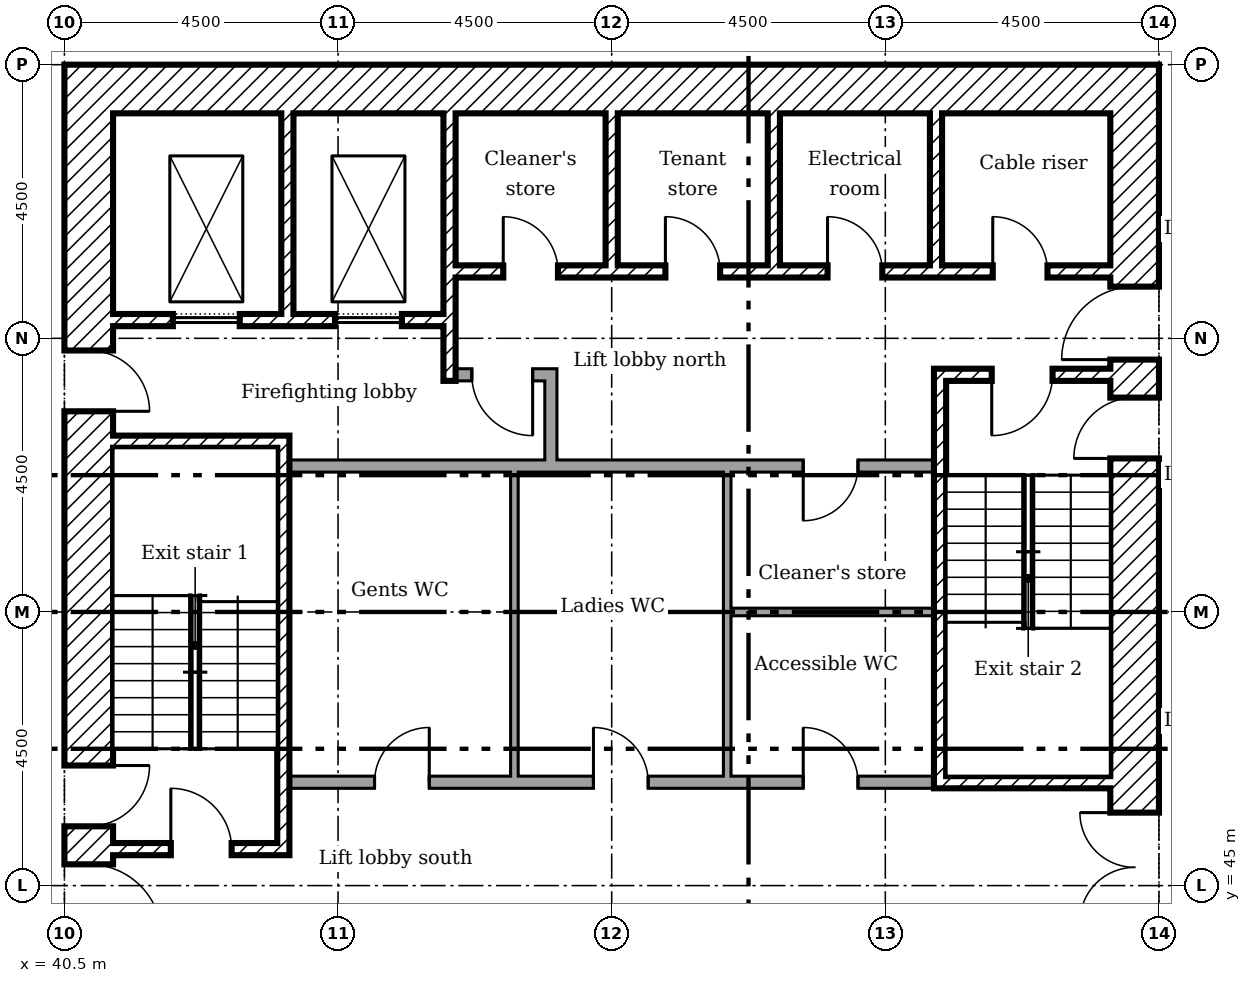
"""IFC4 building model, lengths in metres.
Left out: names, types, materials, properties, quantities, classifications, styles, units other than length and angle.
Written with IfcOpenShell. Run it as: python <this file> out.ifc"""

import sys

from ifc_helpers import new_model, si_unit, direction, frame, frame_2d, origin, place, context, subcontext, project, spatial, rectangle, extrude, element, fill, save


model = new_model("IFC4")
c1 = context("Model", 3, precision=1e-05, world=origin(), true_north=direction((0.0, 1.0)))
c2 = subcontext(c1, "Body", "Model", "MODEL_VIEW")
j1 = project(units=[si_unit("LENGTHUNIT", "METRE"), si_unit("PLANEANGLEUNIT", "RADIAN")], contexts=[c1])
p1 = place(None, origin())
s1 = spatial("IfcSite", under=j1, at=p1, CompositionType="ELEMENT")
p2 = place(p1, origin())
s2 = spatial("IfcBuilding", under=s1, at=p2, CompositionType="ELEMENT")
p3 = place(p2, frame((0.0, 0.0, 76.2)))
s3 = spatial("IfcBuildingStorey", under=s2, at=p3, CompositionType="ELEMENT", Elevation=76.2)
p4 = place(p3, frame((58.1, 40.5, 0.0), z_axis=(0.0, 0.0, 1.0), x_axis=(0.0, 1.0, 0.0)))
e1 = element("IfcWall", 1, at=p4, inside=s3, PredefinedType="SHEAR", context=c2, shape_type="SweptSolid", body=[
    extrude(rectangle(XDim=18.0, YDim=0.8, at=frame_2d((9.0, 0.0))), origin(), (0.0, 0.0, 1.0), 3.35),
])
p5 = place(p4, frame((13.15, 0.0, 0.0)))
e2 = element("IfcOpeningElement", 2, at=p5, cuts=e1, PredefinedType="OPENING", context=c2, shape_type="SweptSolid", body=[
    extrude(rectangle(XDim=1.2, YDim=2.1, at=frame_2d((0.6, 1.05))), frame((0.0, 0.41, 0.0), z_axis=(0.0, -1.0, 0.0), x_axis=(1.0, 0.0, 0.0)), (0.0, 0.0, 1.0), 0.82),
])
p6 = place(p4, frame((3.9, 0.0, 0.0)))
e3 = element("IfcOpeningElement", 3, at=p6, cuts=e1, PredefinedType="OPENING", context=c2, shape_type="SweptSolid", body=[
    extrude(rectangle(XDim=1.8, YDim=2.1, at=frame_2d((0.9, 1.05))), frame((0.0, 0.41, 0.0), z_axis=(0.0, -1.0, 0.0), x_axis=(1.0, 0.0, 0.0)), (0.0, 0.0, 1.0), 0.82),
])
p7 = place(p4, frame((11.525, 0.0, 0.0)))
e4 = element("IfcOpeningElement", 4, at=p7, cuts=e1, PredefinedType="OPENING", context=c2, shape_type="SweptSolid", body=[
    extrude(rectangle(XDim=1.0, YDim=2.1, at=frame_2d((0.5, 1.05))), frame((0.0, 0.41, 0.0), z_axis=(0.0, -1.0, 0.0), x_axis=(1.0, 0.0, 0.0)), (0.0, 0.0, 1.0), 0.82),
])
p8 = place(p3, frame((41.3, 58.1, 0.0)))
e5 = element("IfcWall", 5, at=p8, inside=s3, PredefinedType="SHEAR", context=c2, shape_type="SweptSolid", body=[
    extrude(rectangle(XDim=16.4, YDim=0.8, at=frame_2d((8.2, 0.0))), origin(), (0.0, 0.0, 1.0), 3.35),
])
p9 = place(p3, frame((40.9, 40.5, 0.0), z_axis=(0.0, 0.0, 1.0), x_axis=(0.0, 1.0, 0.0)))
e6 = element("IfcWall", 6, at=p9, inside=s3, PredefinedType="SHEAR", context=c2, shape_type="SweptSolid", body=[
    extrude(rectangle(XDim=18.0, YDim=0.8, at=frame_2d((9.0, 0.0))), origin(), (0.0, 0.0, 1.0), 3.35),
])
p10 = place(p9, frame((3.65, 0.0, 0.0)))
e7 = element("IfcOpeningElement", 7, at=p10, cuts=e6, PredefinedType="OPENING", context=c2, shape_type="SweptSolid", body=[
    extrude(rectangle(XDim=1.2, YDim=2.1, at=frame_2d((0.6, 1.05))), frame((0.0, 0.41, 0.0), z_axis=(0.0, -1.0, 0.0), x_axis=(1.0, 0.0, 0.0)), (0.0, 0.0, 1.0), 0.82),
])
p11 = place(p9, frame((5.475, 0.0, 0.0)))
e8 = element("IfcOpeningElement", 8, at=p11, cuts=e6, PredefinedType="OPENING", context=c2, shape_type="SweptSolid", body=[
    extrude(rectangle(XDim=1.0, YDim=2.1, at=frame_2d((0.5, 1.05))), frame((0.0, 0.41, 0.0), z_axis=(0.0, -1.0, 0.0), x_axis=(1.0, 0.0, 0.0)), (0.0, 0.0, 1.0), 0.82),
])
p12 = place(p9, frame((12.3, 0.0, 0.0)))
e9 = element("IfcOpeningElement", 9, at=p12, cuts=e6, PredefinedType="OPENING", context=c2, shape_type="SweptSolid", body=[
    extrude(rectangle(XDim=1.0, YDim=2.1, at=frame_2d((0.5, 1.05))), frame((0.0, 0.41, 0.0), z_axis=(0.0, -1.0, 0.0), x_axis=(1.0, 0.0, 0.0)), (0.0, 0.0, 1.0), 0.82),
])
p13 = place(p3, frame((44.167, 57.7, 0.0), z_axis=(0.0, 0.0, 1.0), x_axis=(0.0, -1.0, 0.0)))
e10 = element("IfcWall", 10, at=p13, inside=s3, PredefinedType="SHEAR", context=c2, shape_type="SweptSolid", body=[
    extrude(rectangle(XDim=3.3, YDim=0.2, at=frame_2d((1.65, 0.0))), origin(), (0.0, 0.0, 1.0), 3.35),
])
p14 = place(p3, frame((46.833, 57.7, 0.0), z_axis=(0.0, 0.0, 1.0), x_axis=(0.0, -1.0, 0.0)))
e11 = element("IfcWall", 11, at=p14, inside=s3, PredefinedType="SHEAR", context=c2, shape_type="SweptSolid", body=[
    extrude(rectangle(XDim=4.4, YDim=0.2, at=frame_2d((2.2, 0.0))), origin(), (0.0, 0.0, 1.0), 3.35),
])
for number, where, z_axis, x_axis in (
    (12, (49.5, 57.7, 0.0), (0.0, 0.0, 1.0), (0.0, -1.0, 0.0)),
    (13, (52.167, 57.7, 0.0), (0.0, 0.0, 1.0), (0.0, -1.0, 0.0)),
    (14, (54.833, 57.7, 0.0), (0.0, 0.0, 1.0), (0.0, -1.0, 0.0)),
):
    element("IfcWall", number, at=place(p3, frame(where, z_axis=z_axis, x_axis=x_axis)), inside=s3, PredefinedType="SHEAR", context=c2, shape_type="SweptSolid", body=[
        extrude(rectangle(XDim=2.5, YDim=0.2, at=frame_2d((1.25, 0.0))), origin(), (0.0, 0.0, 1.0), 3.35),
    ])
p15 = place(p3, frame((48.5, 51.9, 0.0), z_axis=(0.0, 0.0, 1.0), x_axis=(0.0, 1.0, 0.0)))
e15 = element("IfcWall", 15, at=p15, inside=s3, PredefinedType="PARTITIONING", context=c2, shape_type="SweptSolid", body=[
    extrude(rectangle(XDim=1.6, YDim=0.2, at=frame_2d((0.8, 0.0))), origin(), (0.0, 0.0, 1.0), 3.35),
])
p16 = place(p3, frame((46.933, 53.4, 0.0)))
e16 = element("IfcWall", 16, at=p16, inside=s3, PredefinedType="PARTITIONING", context=c2, shape_type="SweptSolid", body=[
    extrude(rectangle(XDim=1.467, YDim=0.2, at=frame_2d((0.733, 0.0))), origin(), (0.0, 0.0, 1.0), 3.35),
])
p17 = place(p16, frame((0.267, 0.0, 0.0)))
e17 = element("IfcOpeningElement", 17, at=p17, cuts=e16, PredefinedType="OPENING", context=c2, shape_type="SweptSolid", body=[
    extrude(rectangle(XDim=1.0, YDim=2.1, at=frame_2d((0.5, 1.05))), frame((0.0, 0.11, 0.0), z_axis=(0.0, -1.0, 0.0), x_axis=(1.0, 0.0, 0.0)), (0.0, 0.0, 1.0), 0.22),
])
p18 = place(p3, frame((46.933, 55.1, 0.0)))
e18 = element("IfcWall", 18, at=p18, inside=s3, PredefinedType="SHEAR", context=c2, shape_type="SweptSolid", body=[
    extrude(rectangle(XDim=10.767, YDim=0.2, at=frame_2d((5.383, 0.0))), origin(), (0.0, 0.0, 1.0), 3.35),
])
p19 = place(p18, frame((8.833, 0.0, 0.0)))
e19 = element("IfcOpeningElement", 19, at=p19, cuts=e18, PredefinedType="OPENING", context=c2, shape_type="SweptSolid", body=[
    extrude(rectangle(XDim=0.9, YDim=2.1, at=frame_2d((0.45, 1.05))), frame((0.0, 0.11, 0.0), z_axis=(0.0, -1.0, 0.0), x_axis=(1.0, 0.0, 0.0)), (0.0, 0.0, 1.0), 0.22),
])
p20 = place(p18, frame((0.783, 0.0, 0.0)))
e20 = element("IfcOpeningElement", 20, at=p20, cuts=e18, PredefinedType="OPENING", context=c2, shape_type="SweptSolid", body=[
    extrude(rectangle(XDim=0.9, YDim=2.1, at=frame_2d((0.45, 1.05))), frame((0.0, 0.11, 0.0), z_axis=(0.0, -1.0, 0.0), x_axis=(1.0, 0.0, 0.0)), (0.0, 0.0, 1.0), 0.22),
])
p21 = place(p18, frame((3.45, 0.0, 0.0)))
e21 = element("IfcOpeningElement", 21, at=p21, cuts=e18, PredefinedType="OPENING", context=c2, shape_type="SweptSolid", body=[
    extrude(rectangle(XDim=0.9, YDim=2.1, at=frame_2d((0.45, 1.05))), frame((0.0, 0.11, 0.0), z_axis=(0.0, -1.0, 0.0), x_axis=(1.0, 0.0, 0.0)), (0.0, 0.0, 1.0), 0.22),
])
p22 = place(p18, frame((6.117, 0.0, 0.0)))
e22 = element("IfcOpeningElement", 22, at=p22, cuts=e18, PredefinedType="OPENING", context=c2, shape_type="SweptSolid", body=[
    extrude(rectangle(XDim=0.9, YDim=2.1, at=frame_2d((0.45, 1.05))), frame((0.0, 0.11, 0.0), z_axis=(0.0, -1.0, 0.0), x_axis=(1.0, 0.0, 0.0)), (0.0, 0.0, 1.0), 0.22),
])
p23 = place(p3, frame((41.3, 54.3, 0.0)))
e23 = element("IfcWall", 23, at=p23, inside=s3, PredefinedType="SHEAR", context=c2, shape_type="SweptSolid", body=[
    extrude(rectangle(XDim=5.433, YDim=0.2, at=frame_2d((2.717, 0.0))), origin(), (0.0, 0.0, 1.0), 3.35),
])
p24 = place(p23, frame((0.983, 0.0, 0.0)))
e24 = element("IfcOpeningElement", 24, at=p24, cuts=e23, PredefinedType="OPENING", context=c2, shape_type="SweptSolid", body=[
    extrude(rectangle(XDim=1.1, YDim=2.1, at=frame_2d((0.55, 1.05))), frame((0.0, 0.11, 0.0), z_axis=(0.0, -1.0, 0.0), x_axis=(1.0, 0.0, 0.0)), (0.0, 0.0, 1.0), 0.22),
])
p25 = place(p23, frame((3.65, 0.0, 0.0)))
e25 = element("IfcOpeningElement", 25, at=p25, cuts=e23, PredefinedType="OPENING", context=c2, shape_type="SweptSolid", body=[
    extrude(rectangle(XDim=1.1, YDim=2.1, at=frame_2d((0.55, 1.05))), frame((0.0, 0.11, 0.0), z_axis=(0.0, -1.0, 0.0), x_axis=(1.0, 0.0, 0.0)), (0.0, 0.0, 1.0), 0.22),
])
p26 = place(p3, frame((44.1, 45.5, 0.0), z_axis=(0.0, 0.0, 1.0), x_axis=(0.0, 1.0, 0.0)))
e26 = element("IfcWall", 26, at=p26, inside=s3, PredefinedType="SHEAR", context=c2, shape_type="SweptSolid", body=[
    extrude(rectangle(XDim=6.9, YDim=0.2, at=frame_2d((3.45, 0.0))), origin(), (0.0, 0.0, 1.0), 3.35),
])
p27 = place(p3, frame((41.3, 52.3, 0.0)))
e27 = element("IfcWall", 27, at=p27, inside=s3, PredefinedType="SHEAR", context=c2, shape_type="SweptSolid", body=[
    extrude(rectangle(XDim=2.7, YDim=0.2, at=frame_2d((1.35, 0.0))), origin(), (0.0, 0.0, 1.0), 3.35),
])
p28 = place(p3, frame((41.3, 45.6, 0.0)))
e28 = element("IfcWall", 28, at=p28, inside=s3, PredefinedType="SHEAR", context=c2, shape_type="SweptSolid", body=[
    extrude(rectangle(XDim=2.7, YDim=0.2, at=frame_2d((1.35, 0.0))), origin(), (0.0, 0.0, 1.0), 3.35),
])
p29 = place(p28, frame((0.95, 0.0, 0.0)))
e29 = element("IfcOpeningElement", 29, at=p29, cuts=e28, PredefinedType="OPENING", context=c2, shape_type="SweptSolid", body=[
    extrude(rectangle(XDim=1.0, YDim=2.1, at=frame_2d((0.5, 1.05))), frame((0.0, 0.11, 0.0), z_axis=(0.0, -1.0, 0.0), x_axis=(1.0, 0.0, 0.0)), (0.0, 0.0, 1.0), 0.22),
])
p30 = place(p3, frame((54.8, 53.4, 0.0)))
e30 = element("IfcWall", 30, at=p30, inside=s3, PredefinedType="SHEAR", context=c2, shape_type="SweptSolid", body=[
    extrude(rectangle(XDim=2.9, YDim=0.2, at=frame_2d((1.45, 0.0))), origin(), (0.0, 0.0, 1.0), 3.35),
])
p31 = place(p30, frame((0.95, 0.0, 0.0)))
e31 = element("IfcOpeningElement", 31, at=p31, cuts=e30, PredefinedType="OPENING", context=c2, shape_type="SweptSolid", body=[
    extrude(rectangle(XDim=1.0, YDim=2.1, at=frame_2d((0.5, 1.05))), frame((0.0, 0.11, 0.0), z_axis=(0.0, -1.0, 0.0), x_axis=(1.0, 0.0, 0.0)), (0.0, 0.0, 1.0), 0.22),
])
p32 = place(p3, frame((54.8, 46.7, 0.0)))
e32 = element("IfcWall", 32, at=p32, inside=s3, PredefinedType="SHEAR", context=c2, shape_type="SweptSolid", body=[
    extrude(rectangle(XDim=2.9, YDim=0.2, at=frame_2d((1.45, 0.0))), origin(), (0.0, 0.0, 1.0), 3.35),
])
p33 = place(p3, frame((54.9, 46.8, 0.0), z_axis=(0.0, 0.0, 1.0), x_axis=(0.0, 1.0, 0.0)))
e33 = element("IfcWall", 33, at=p33, inside=s3, PredefinedType="SHEAR", context=c2, shape_type="SweptSolid", body=[
    extrude(rectangle(XDim=6.5, YDim=0.2, at=frame_2d((3.25, 0.0))), origin(), (0.0, 0.0, 1.0), 3.35),
])
p34 = place(p3, frame((44.2, 51.9, 0.0)))
e34 = element("IfcWall", 34, at=p34, inside=s3, PredefinedType="PARTITIONING", context=c2, shape_type="SweptSolid", body=[
    extrude(rectangle(XDim=10.6, YDim=0.2, at=frame_2d((5.3, 0.0))), origin(), (0.0, 0.0, 1.0), 3.35),
])
p35 = place(p34, frame((8.45, 0.0, 0.0)))
e35 = element("IfcOpeningElement", 35, at=p35, cuts=e34, PredefinedType="OPENING", context=c2, shape_type="SweptSolid", body=[
    extrude(rectangle(XDim=0.9, YDim=2.1, at=frame_2d((0.45, 1.05))), frame((0.0, 0.11, 0.0), z_axis=(0.0, -1.0, 0.0), x_axis=(1.0, 0.0, 0.0)), (0.0, 0.0, 1.0), 0.22),
])
p36 = place(p3, frame((44.2, 46.7, 0.0)))
e36 = element("IfcWall", 36, at=p36, inside=s3, PredefinedType="PARTITIONING", context=c2, shape_type="SweptSolid", body=[
    extrude(rectangle(XDim=10.6, YDim=0.2, at=frame_2d((5.3, 0.0))), origin(), (0.0, 0.0, 1.0), 3.35),
])
p37 = place(p36, frame((1.4, 0.0, 0.0)))
e37 = element("IfcOpeningElement", 37, at=p37, cuts=e36, PredefinedType="OPENING", context=c2, shape_type="SweptSolid", body=[
    extrude(rectangle(XDim=0.9, YDim=2.1, at=frame_2d((0.45, 1.05))), frame((0.0, 0.11, 0.0), z_axis=(0.0, -1.0, 0.0), x_axis=(1.0, 0.0, 0.0)), (0.0, 0.0, 1.0), 0.22),
])
p38 = place(p36, frame((5.0, 0.0, 0.0)))
e38 = element("IfcOpeningElement", 38, at=p38, cuts=e36, PredefinedType="OPENING", context=c2, shape_type="SweptSolid", body=[
    extrude(rectangle(XDim=0.9, YDim=2.1, at=frame_2d((0.45, 1.05))), frame((0.0, 0.11, 0.0), z_axis=(0.0, -1.0, 0.0), x_axis=(1.0, 0.0, 0.0)), (0.0, 0.0, 1.0), 0.22),
])
p39 = place(p36, frame((8.45, 0.0, 0.0)))
e39 = element("IfcOpeningElement", 39, at=p39, cuts=e36, PredefinedType="OPENING", context=c2, shape_type="SweptSolid", body=[
    extrude(rectangle(XDim=0.9, YDim=2.1, at=frame_2d((0.45, 1.05))), frame((0.0, 0.11, 0.0), z_axis=(0.0, -1.0, 0.0), x_axis=(1.0, 0.0, 0.0)), (0.0, 0.0, 1.0), 0.22),
])
p40 = place(p3, frame((47.9, 46.8, 0.0), z_axis=(0.0, 0.0, 1.0), x_axis=(0.0, 1.0, 0.0)))
e40 = element("IfcWall", 40, at=p40, inside=s3, PredefinedType="PARTITIONING", context=c2, shape_type="SweptSolid", body=[
    extrude(rectangle(XDim=5.0, YDim=0.125, at=frame_2d((2.5, 0.0))), origin(), (0.0, 0.0, 1.0), 3.35),
])
p41 = place(p3, frame((51.4, 46.8, 0.0), z_axis=(0.0, 0.0, 1.0), x_axis=(0.0, 1.0, 0.0)))
e41 = element("IfcWall", 41, at=p41, inside=s3, PredefinedType="PARTITIONING", context=c2, shape_type="SweptSolid", body=[
    extrude(rectangle(XDim=2.762, YDim=0.125, at=frame_2d((1.381, 0.0))), origin(), (0.0, 0.0, 1.0), 3.35),
])
p42 = place(p3, frame((54.8, 49.5, 0.0), z_axis=(0.0, 0.0, 1.0), x_axis=(-1.0, 0.0, 0.0)))
e42 = element("IfcWall", 42, at=p42, inside=s3, PredefinedType="PARTITIONING", context=c2, shape_type="SweptSolid", body=[
    extrude(rectangle(XDim=3.338, YDim=0.125, at=frame_2d((1.669, 0.0))), origin(), (0.0, 0.0, 1.0), 3.35),
])
p43 = place(p3, frame((51.4, 49.5, 0.0), z_axis=(0.0, 0.0, 1.0), x_axis=(0.0, 1.0, 0.0)))
e43 = element("IfcWall", 43, at=p43, inside=s3, PredefinedType="PARTITIONING", context=c2, shape_type="SweptSolid", body=[
    extrude(rectangle(XDim=2.3, YDim=0.125, at=frame_2d((1.15, 0.0))), origin(), (0.0, 0.0, 1.0), 3.35),
])
p44 = place(p5, origin())
e44 = element("IfcDoor", 44, at=p44, inside=s3, OperationType="SINGLE_SWING_RIGHT", PredefinedType="DOOR", context=c2, shape_type="SweptSolid", body=[
    extrude(rectangle(XDim=1.2, YDim=2.1, at=frame_2d((0.6, 1.05))), frame((0.0, 0.025, 0.0), z_axis=(0.0, -1.0, 0.0), x_axis=(1.0, 0.0, 0.0)), (0.0, 0.0, 1.0), 0.05),
])
fill(e2, e44)
p45 = place(p6, origin())
e45 = element("IfcDoor", 45, at=p45, inside=s3, OperationType="DOUBLE_DOOR_SINGLE_SWING", PredefinedType="DOOR", context=c2, shape_type="SweptSolid", body=[
    extrude(rectangle(XDim=1.8, YDim=2.1, at=frame_2d((0.9, 1.05))), frame((0.0, 0.025, 0.0), z_axis=(0.0, -1.0, 0.0), x_axis=(1.0, 0.0, 0.0)), (0.0, 0.0, 1.0), 0.05),
])
fill(e3, e45)
p46 = place(p10, frame((1.2, 0.0, 0.0), x_axis=(-1.0, 0.0, 0.0)))
e46 = element("IfcDoor", 46, at=p46, inside=s3, OperationType="SINGLE_SWING_LEFT", PredefinedType="DOOR", context=c2, shape_type="SweptSolid", body=[
    extrude(rectangle(XDim=1.2, YDim=2.1, at=frame_2d((0.6, 1.05))), frame((0.0, 0.025, 0.0), z_axis=(0.0, -1.0, 0.0), x_axis=(1.0, 0.0, 0.0)), (0.0, 0.0, 1.0), 0.05),
])
fill(e7, e46)
p47 = place(p29, origin())
e47 = element("IfcDoor", 47, at=p47, inside=s3, OperationType="SINGLE_SWING_RIGHT", PredefinedType="DOOR", context=c2, shape_type="SweptSolid", body=[
    extrude(rectangle(XDim=1.0, YDim=2.1, at=frame_2d((0.5, 1.05))), frame((0.0, 0.025, 0.0), z_axis=(0.0, -1.0, 0.0), x_axis=(1.0, 0.0, 0.0)), (0.0, 0.0, 1.0), 0.05),
])
fill(e29, e47)
p48 = place(p11, frame((1.0, 0.0, 0.0), x_axis=(-1.0, 0.0, 0.0)))
e48 = element("IfcDoor", 48, at=p48, inside=s3, OperationType="SINGLE_SWING_RIGHT", PredefinedType="DOOR", context=c2, shape_type="SweptSolid", body=[
    extrude(rectangle(XDim=1.0, YDim=2.1, at=frame_2d((0.5, 1.05))), frame((0.0, 0.025, 0.0), z_axis=(0.0, -1.0, 0.0), x_axis=(1.0, 0.0, 0.0)), (0.0, 0.0, 1.0), 0.05),
])
fill(e8, e48)
p49 = place(p31, frame((1.0, 0.0, 0.0), x_axis=(-1.0, 0.0, 0.0)))
e49 = element("IfcDoor", 49, at=p49, inside=s3, OperationType="SINGLE_SWING_LEFT", PredefinedType="DOOR", context=c2, shape_type="SweptSolid", body=[
    extrude(rectangle(XDim=1.0, YDim=2.1, at=frame_2d((0.5, 1.05))), frame((0.0, 0.025, 0.0), z_axis=(0.0, -1.0, 0.0), x_axis=(1.0, 0.0, 0.0)), (0.0, 0.0, 1.0), 0.05),
])
fill(e31, e49)
p50 = place(p7, origin())
e50 = element("IfcDoor", 50, at=p50, inside=s3, OperationType="SINGLE_SWING_RIGHT", PredefinedType="DOOR", context=c2, shape_type="SweptSolid", body=[
    extrude(rectangle(XDim=1.0, YDim=2.1, at=frame_2d((0.5, 1.05))), frame((0.0, 0.025, 0.0), z_axis=(0.0, -1.0, 0.0), x_axis=(1.0, 0.0, 0.0)), (0.0, 0.0, 1.0), 0.05),
])
fill(e4, e50)
p51 = place(p17, frame((1.0, 0.0, 0.0), x_axis=(-1.0, 0.0, 0.0)))
e51 = element("IfcDoor", 51, at=p51, inside=s3, OperationType="SINGLE_SWING_RIGHT", PredefinedType="DOOR", context=c2, shape_type="SweptSolid", body=[
    extrude(rectangle(XDim=1.0, YDim=2.1, at=frame_2d((0.5, 1.05))), frame((0.0, 0.025, 0.0), z_axis=(0.0, -1.0, 0.0), x_axis=(1.0, 0.0, 0.0)), (0.0, 0.0, 1.0), 0.05),
])
fill(e17, e51)
p52 = place(p12, frame((1.0, 0.0, 0.0), x_axis=(-1.0, 0.0, 0.0)))
e52 = element("IfcDoor", 52, at=p52, inside=s3, OperationType="SINGLE_SWING_LEFT", PredefinedType="DOOR", context=c2, shape_type="SweptSolid", body=[
    extrude(rectangle(XDim=1.0, YDim=2.1, at=frame_2d((0.5, 1.05))), frame((0.0, 0.025, 0.0), z_axis=(0.0, -1.0, 0.0), x_axis=(1.0, 0.0, 0.0)), (0.0, 0.0, 1.0), 0.05),
])
fill(e9, e52)
p53 = place(p19, origin())
e53 = element("IfcDoor", 53, at=p53, inside=s3, OperationType="SINGLE_SWING_RIGHT", PredefinedType="DOOR", context=c2, shape_type="SweptSolid", body=[
    extrude(rectangle(XDim=0.9, YDim=2.1, at=frame_2d((0.45, 1.05))), frame((0.0, 0.025, 0.0), z_axis=(0.0, -1.0, 0.0), x_axis=(1.0, 0.0, 0.0)), (0.0, 0.0, 1.0), 0.05),
])
fill(e19, e53)
p54 = place(p20, origin())
e54 = element("IfcDoor", 54, at=p54, inside=s3, OperationType="SINGLE_SWING_RIGHT", PredefinedType="DOOR", context=c2, shape_type="SweptSolid", body=[
    extrude(rectangle(XDim=0.9, YDim=2.1, at=frame_2d((0.45, 1.05))), frame((0.0, 0.025, 0.0), z_axis=(0.0, -1.0, 0.0), x_axis=(1.0, 0.0, 0.0)), (0.0, 0.0, 1.0), 0.05),
])
fill(e20, e54)
p55 = place(p21, origin())
e55 = element("IfcDoor", 55, at=p55, inside=s3, OperationType="SINGLE_SWING_RIGHT", PredefinedType="DOOR", context=c2, shape_type="SweptSolid", body=[
    extrude(rectangle(XDim=0.9, YDim=2.1, at=frame_2d((0.45, 1.05))), frame((0.0, 0.025, 0.0), z_axis=(0.0, -1.0, 0.0), x_axis=(1.0, 0.0, 0.0)), (0.0, 0.0, 1.0), 0.05),
])
fill(e21, e55)
p56 = place(p22, origin())
e56 = element("IfcDoor", 56, at=p56, inside=s3, OperationType="SINGLE_SWING_RIGHT", PredefinedType="DOOR", context=c2, shape_type="SweptSolid", body=[
    extrude(rectangle(XDim=0.9, YDim=2.1, at=frame_2d((0.45, 1.05))), frame((0.0, 0.025, 0.0), z_axis=(0.0, -1.0, 0.0), x_axis=(1.0, 0.0, 0.0)), (0.0, 0.0, 1.0), 0.05),
])
fill(e22, e56)
p57 = place(p37, origin())
e57 = element("IfcDoor", 57, at=p57, inside=s3, OperationType="SINGLE_SWING_LEFT", PredefinedType="DOOR", context=c2, shape_type="SweptSolid", body=[
    extrude(rectangle(XDim=0.9, YDim=2.1, at=frame_2d((0.45, 1.05))), frame((0.0, 0.025, 0.0), z_axis=(0.0, -1.0, 0.0), x_axis=(1.0, 0.0, 0.0)), (0.0, 0.0, 1.0), 0.05),
])
fill(e37, e57)
p58 = place(p38, origin())
e58 = element("IfcDoor", 58, at=p58, inside=s3, OperationType="SINGLE_SWING_RIGHT", PredefinedType="DOOR", context=c2, shape_type="SweptSolid", body=[
    extrude(rectangle(XDim=0.9, YDim=2.1, at=frame_2d((0.45, 1.05))), frame((0.0, 0.025, 0.0), z_axis=(0.0, -1.0, 0.0), x_axis=(1.0, 0.0, 0.0)), (0.0, 0.0, 1.0), 0.05),
])
fill(e38, e58)
p59 = place(p39, origin())
e59 = element("IfcDoor", 59, at=p59, inside=s3, OperationType="SINGLE_SWING_RIGHT", PredefinedType="DOOR", context=c2, shape_type="SweptSolid", body=[
    extrude(rectangle(XDim=0.9, YDim=2.1, at=frame_2d((0.45, 1.05))), frame((0.0, 0.025, 0.0), z_axis=(0.0, -1.0, 0.0), x_axis=(1.0, 0.0, 0.0)), (0.0, 0.0, 1.0), 0.05),
])
fill(e39, e59)
p60 = place(p35, frame((0.9, 0.0, 0.0), x_axis=(-1.0, 0.0, 0.0)))
e60 = element("IfcDoor", 60, at=p60, inside=s3, OperationType="SINGLE_SWING_LEFT", PredefinedType="DOOR", context=c2, shape_type="SweptSolid", body=[
    extrude(rectangle(XDim=0.9, YDim=2.1, at=frame_2d((0.45, 1.05))), frame((0.0, 0.025, 0.0), z_axis=(0.0, -1.0, 0.0), x_axis=(1.0, 0.0, 0.0)), (0.0, 0.0, 1.0), 0.05),
])
fill(e35, e60)
p61 = place(p24, origin())
e61 = element("IfcDoor", 61, at=p61, inside=s3, OperationType="SLIDING_TO_LEFT", PredefinedType="DOOR", context=c2, shape_type="SweptSolid", body=[
    extrude(rectangle(XDim=1.1, YDim=2.1, at=frame_2d((0.55, 1.05))), frame((0.0, 0.025, 0.0), z_axis=(0.0, -1.0, 0.0), x_axis=(1.0, 0.0, 0.0)), (0.0, 0.0, 1.0), 0.05),
])
fill(e24, e61)
p62 = place(p25, origin())
e62 = element("IfcDoor", 62, at=p62, inside=s3, OperationType="SLIDING_TO_LEFT", PredefinedType="DOOR", context=c2, shape_type="SweptSolid", body=[
    extrude(rectangle(XDim=1.1, YDim=2.1, at=frame_2d((0.55, 1.05))), frame((0.0, 0.025, 0.0), z_axis=(0.0, -1.0, 0.0), x_axis=(1.0, 0.0, 0.0)), (0.0, 0.0, 1.0), 0.05),
])
fill(e25, e62)
save(model, sys.argv[1])
